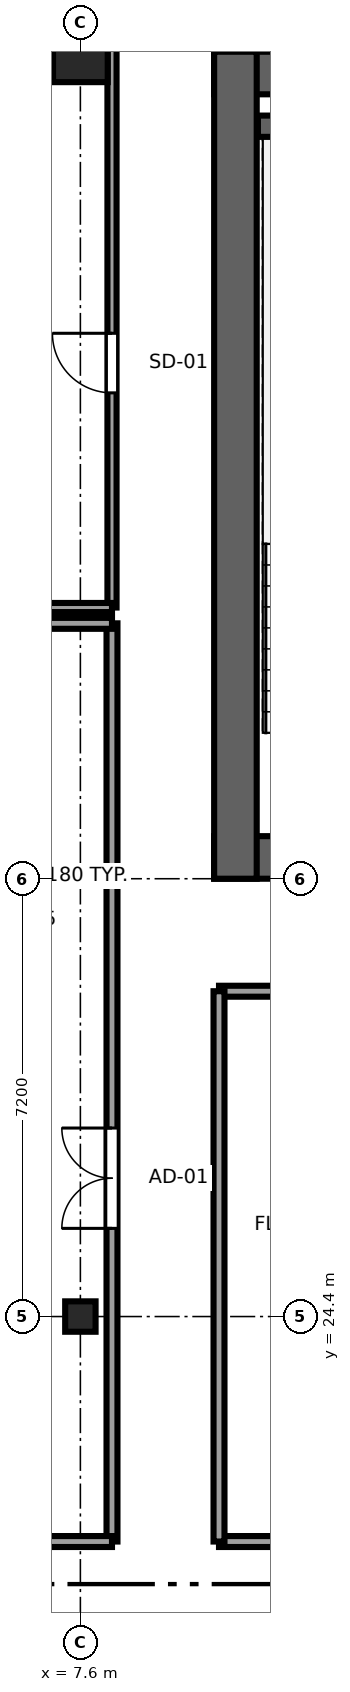
"""IFC4 building model, lengths in metres.
Left out: names, types, materials, properties, quantities, classifications, styles, units other than length and angle.
Written with IfcOpenShell. Run it as: python <this file> out.ifc"""

import sys

from ifc_helpers import new_model, si_unit, direction, frame, frame_2d, origin, origin_2d, place, context, subcontext, project, spatial, rectangle, i_section, extrude, source, transform, mapped, element, fill, save


model = new_model("IFC4")
c1 = context("Model", 3, precision=1e-05, world=origin(), true_north=direction((0.0, 1.0)))
c2 = subcontext(c1, "Body", "Model", "MODEL_VIEW")
j1 = project(units=[si_unit("LENGTHUNIT", "METRE"), si_unit("PLANEANGLEUNIT", "RADIAN")], contexts=[c1])
p1 = place(None, origin())
s1 = spatial("IfcSite", under=j1, at=p1, CompositionType="ELEMENT")
p2 = place(p1, origin())
s2 = spatial("IfcBuilding", under=s1, at=p2, CompositionType="ELEMENT")
p3 = place(p2, frame((0.0, 0.0, 100.9)))
s3 = spatial("IfcBuildingStorey", under=s2, at=p3, CompositionType="ELEMENT", Elevation=100.9)
p4 = place(p3, frame((9.8, 31.95, 0.0), z_axis=(0.0, 0.0, 1.0), x_axis=(1.0, 0.0, 0.0)))
e1 = element("IfcWall", 1, at=p4, inside=s3, PredefinedType="SHEAR", context=c2, shape_type="SweptSolid", body=[
    extrude(rectangle(XDim=26.4, YDim=0.7, at=frame_2d((13.2, 0.0))), origin(), (0.0, 0.0, 1.0), 3.55),
])
p5 = place(p4, frame((6.32, 0.0, 0.0), z_axis=(0.0, 0.0, 1.0), x_axis=(-1.0, 0.0, 0.0)))
e2 = element("IfcOpeningElement", 2, at=p5, cuts=e1, PredefinedType="OPENING", context=c2, shape_type="SweptSolid", body=[
    extrude(rectangle(XDim=1.5, YDim=2.04, at=frame_2d((0.75, 1.02))), frame((0.0, 0.36, 0.0), z_axis=(0.0, -1.0, 0.0), x_axis=(1.0, 0.0, 0.0)), (0.0, 0.0, 1.0), 0.72),
])
p6 = place(p4, frame((13.95, 0.0, 0.0), z_axis=(0.0, 0.0, 1.0), x_axis=(-1.0, 0.0, 0.0)))
e3 = element("IfcOpeningElement", 3, at=p6, cuts=e1, PredefinedType="OPENING", context=c2, shape_type="SweptSolid", body=[
    extrude(rectangle(XDim=1.5, YDim=2.04, at=frame_2d((0.75, 1.02))), frame((0.0, 0.36, 0.0), z_axis=(0.0, -1.0, 0.0), x_axis=(1.0, 0.0, 0.0)), (0.0, 0.0, 1.0), 0.72),
])
p7 = place(p4, frame((20.25, 0.0, 0.0), z_axis=(0.0, 0.0, 1.0), x_axis=(-1.0, 0.0, 0.0)))
e4 = element("IfcOpeningElement", 4, at=p7, cuts=e1, PredefinedType="OPENING", context=c2, shape_type="SweptSolid", body=[
    extrude(rectangle(XDim=1.5, YDim=2.04, at=frame_2d((0.75, 1.02))), frame((0.0, 0.36, 0.0), z_axis=(0.0, -1.0, 0.0), x_axis=(1.0, 0.0, 0.0)), (0.0, 0.0, 1.0), 0.72),
])
p8 = place(p4, frame((8.37, 0.0, 0.0), z_axis=(0.0, 0.0, 1.0), x_axis=(-1.0, 0.0, 0.0)))
e5 = element("IfcOpeningElement", 5, at=p8, cuts=e1, PredefinedType="OPENING", context=c2, shape_type="SweptSolid", body=[
    extrude(rectangle(XDim=0.82, YDim=2.01, at=frame_2d((0.41, 1.005))), frame((0.0, 0.36, 0.0), z_axis=(0.0, -1.0, 0.0), x_axis=(1.0, 0.0, 0.0)), (0.0, 0.0, 1.0), 0.72),
])
p9 = place(p3, frame((9.8, 44.85, 0.0), z_axis=(0.0, 0.0, 1.0), x_axis=(1.0, 0.0, 0.0)))
e6 = element("IfcWall", 6, at=p9, inside=s3, PredefinedType="SHEAR", context=c2, shape_type="SweptSolid", body=[
    extrude(rectangle(XDim=26.4, YDim=0.7, at=frame_2d((13.2, 0.0))), origin(), (0.0, 0.0, 1.0), 3.55),
])
p10 = place(p3, frame((10.15, 31.6, 0.0), z_axis=(0.0, 0.0, 1.0), x_axis=(0.0, 1.0, 0.0)))
e7 = element("IfcWall", 7, at=p10, inside=s3, PredefinedType="SHEAR", context=c2, shape_type="SweptSolid", body=[
    extrude(rectangle(XDim=13.6, YDim=0.7, at=frame_2d((6.8, 0.0))), origin(), (0.0, 0.0, 1.0), 3.55),
])
p11 = place(p3, frame((10.52, 43.975, 0.0), z_axis=(0.0, 0.0, 1.0), x_axis=(1.0, 0.0, 0.0)))
e8 = element("IfcWall", 8, at=p11, inside=s3, PredefinedType="SHEAR", context=c2, shape_type="SweptSolid", body=[
    extrude(rectangle(XDim=3.6, YDim=0.35, at=frame_2d((1.8, 0.0))), origin(), (0.0, 0.0, 1.0), 3.55),
])
m1 = source(origin(), c2, "Body", "SweptSolid", [
    extrude(i_section(OverallWidth=0.5, OverallDepth=0.5, WebThickness=0.022, FlangeThickness=0.034, at=origin_2d()), origin(), (0.0, 0.0, 1.0), 3.55),
])
p12 = place(p3, frame((7.6, 24.4, 0.0), z_axis=(0.0, 0.0, 1.0), x_axis=(1.0, 0.0, 0.0)))
e9 = element("IfcColumn", 9, at=p12, inside=s3, PredefinedType="COLUMN", context=c2, shape_type="MappedRepresentation", body=[
    mapped(m1, transform((0.0, 0.0, 0.0), x_axis=(1.0, 0.0, 0.0), y_axis=(0.0, 1.0, 0.0), z_axis=(0.0, 0.0, 1.0), scale=1.0)),
])
m2 = source(origin(), c2, "Body", "SweptSolid", [
    extrude(rectangle(XDim=0.9, YDim=0.9, at=origin_2d()), origin(), (0.0, 0.0, 1.0), 3.55),
])
p13 = place(p3, frame((7.6, 45.15, 0.0), z_axis=(0.0, 0.0, 1.0), x_axis=(1.0, 0.0, 0.0)))
e10 = element("IfcColumn", 10, at=p13, inside=s3, PredefinedType="COLUMN", context=c2, shape_type="MappedRepresentation", body=[
    mapped(m2, transform((0.0, 0.0, 0.0), x_axis=(1.0, 0.0, 0.0), y_axis=(0.0, 1.0, 0.0), z_axis=(0.0, 0.0, 1.0), scale=1.0)),
])
p14 = place(p3, frame((8.12, 20.7, 0.0), z_axis=(0.0, 0.0, 1.0), x_axis=(0.0, 1.0, 0.0)))
e11 = element("IfcWall", 11, at=p14, inside=s3, PredefinedType="PARTITIONING", context=c2, shape_type="SweptSolid", body=[
    extrude(rectangle(XDim=15.1, YDim=0.18, at=frame_2d((7.55, 0.0))), origin(), (0.0, 0.0, 1.0), 3.37),
])
p15 = place(p14, frame((5.15, 0.0, 0.0)))
e12 = element("IfcOpeningElement", 12, at=p15, cuts=e11, PredefinedType="OPENING", context=c2, shape_type="SweptSolid", body=[
    extrude(rectangle(XDim=1.65, YDim=2.15, at=frame_2d((0.825, 1.075))), frame((0.0, 0.1, 0.0), z_axis=(0.0, -1.0, 0.0), x_axis=(1.0, 0.0, 0.0)), (0.0, 0.0, 1.0), 0.2),
])
for number, where, z_axis, x_axis in (
    (13, (0.3, 20.7, 0.0), (0.0, 0.0, 1.0), (1.0, 0.0, 0.0)),
    (14, (0.3, 35.8, 0.0), (0.0, 0.0, 1.0), (1.0, 0.0, 0.0)),
):
    element("IfcWall", number, at=place(p3, frame(where, z_axis=z_axis, x_axis=x_axis)), inside=s3, PredefinedType="PARTITIONING", context=c2, shape_type="SweptSolid", body=[
        extrude(rectangle(XDim=7.82, YDim=0.18, at=frame_2d((3.91, 0.0))), origin(), (0.0, 0.0, 1.0), 3.37),
    ])
p16 = place(p3, frame((8.12, 36.06, 0.0), z_axis=(0.0, 0.0, 1.0), x_axis=(0.0, 1.0, 0.0)))
e15 = element("IfcWall", 15, at=p16, inside=s3, PredefinedType="PARTITIONING", context=c2, shape_type="SweptSolid", body=[
    extrude(rectangle(XDim=9.535, YDim=0.15, at=frame_2d((4.768, 0.0))), origin(), (0.0, 0.0, 1.0), 3.37),
])
p17 = place(p16, frame((3.53, 0.0, 0.0)))
e16 = element("IfcOpeningElement", 16, at=p17, cuts=e15, PredefinedType="OPENING", context=c2, shape_type="SweptSolid", body=[
    extrude(rectangle(XDim=0.98, YDim=2.12, at=frame_2d((0.49, 1.06))), frame((0.0, 0.085, 0.0), z_axis=(0.0, -1.0, 0.0), x_axis=(1.0, 0.0, 0.0)), (0.0, 0.0, 1.0), 0.17),
])
p18 = place(p3, frame((2.77, 36.06, 0.0), z_axis=(0.0, 0.0, 1.0), x_axis=(1.0, 0.0, 0.0)))
e17 = element("IfcWall", 17, at=p18, inside=s3, PredefinedType="PARTITIONING", context=c2, shape_type="SweptSolid", body=[
    extrude(rectangle(XDim=5.35, YDim=0.15, at=frame_2d((2.675, 0.0))), origin(), (0.0, 0.0, 1.0), 3.37),
])
p19 = place(p3, frame((9.88, 20.7, 0.0), z_axis=(0.0, 0.0, 1.0), x_axis=(1.0, 0.0, 0.0)))
e18 = element("IfcWall", 18, at=p19, inside=s3, PredefinedType="PARTITIONING", context=c2, shape_type="SweptSolid", body=[
    extrude(rectangle(XDim=4.22, YDim=0.18, at=frame_2d((2.11, 0.0))), origin(), (0.0, 0.0, 1.0), 3.37),
])
p20 = place(p19, frame((1.285, 0.0, 0.0)))
e19 = element("IfcOpeningElement", 19, at=p20, cuts=e18, PredefinedType="OPENING", context=c2, shape_type="SweptSolid", body=[
    extrude(rectangle(XDim=1.65, YDim=2.15, at=frame_2d((0.825, 1.075))), frame((0.0, 0.1, 0.0), z_axis=(0.0, -1.0, 0.0), x_axis=(1.0, 0.0, 0.0)), (0.0, 0.0, 1.0), 0.2),
])
p21 = place(p3, frame((9.88, 29.75, 0.0), z_axis=(0.0, 0.0, 1.0), x_axis=(1.0, 0.0, 0.0)))
e20 = element("IfcWall", 20, at=p21, inside=s3, PredefinedType="PARTITIONING", context=c2, shape_type="SweptSolid", body=[
    extrude(rectangle(XDim=4.22, YDim=0.18, at=frame_2d((2.11, 0.0))), origin(), (0.0, 0.0, 1.0), 3.37),
])
p22 = place(p3, frame((9.88, 20.7, 0.0), z_axis=(0.0, 0.0, 1.0), x_axis=(0.0, 1.0, 0.0)))
e21 = element("IfcWall", 21, at=p22, inside=s3, PredefinedType="PARTITIONING", context=c2, shape_type="SweptSolid", body=[
    extrude(rectangle(XDim=9.05, YDim=0.18, at=frame_2d((4.525, 0.0))), origin(), (0.0, 0.0, 1.0), 3.37),
])
m3 = source(origin(), c2, "Body", "SweptSolid", [
    extrude(rectangle(XDim=1.65, YDim=2.15, at=frame_2d((0.825, 1.075))), frame((0.0, 0.025, 0.0), z_axis=(0.0, -1.0, 0.0), x_axis=(1.0, 0.0, 0.0)), (0.0, 0.0, 1.0), 0.05),
])
p23 = place(p15, origin())
e22 = element("IfcDoor", 22, at=p23, inside=s3, OperationType="DOUBLE_DOOR_SINGLE_SWING", PredefinedType="DOOR", context=c2, shape_type="MappedRepresentation", body=[
    mapped(m3, transform((0.0, 0.0, 0.0), x_axis=(1.0, 0.0, 0.0), y_axis=(0.0, 1.0, 0.0), z_axis=(0.0, 0.0, 1.0), scale=1.0)),
])
fill(e12, e22)
m4 = source(origin(), c2, "Body", "SweptSolid", [
    extrude(rectangle(XDim=0.98, YDim=2.12, at=frame_2d((0.49, 1.06))), frame((0.0, 0.025, 0.0), z_axis=(0.0, -1.0, 0.0), x_axis=(1.0, 0.0, 0.0)), (0.0, 0.0, 1.0), 0.05),
])
p24 = place(p17, origin())
e23 = element("IfcDoor", 23, at=p24, inside=s3, OperationType="SINGLE_SWING_RIGHT", PredefinedType="DOOR", context=c2, shape_type="MappedRepresentation", body=[
    mapped(m4, transform((0.0, 0.0, 0.0), x_axis=(1.0, 0.0, 0.0), y_axis=(0.0, 1.0, 0.0), z_axis=(0.0, 0.0, 1.0), scale=1.0)),
])
fill(e16, e23)
save(model, sys.argv[1])
